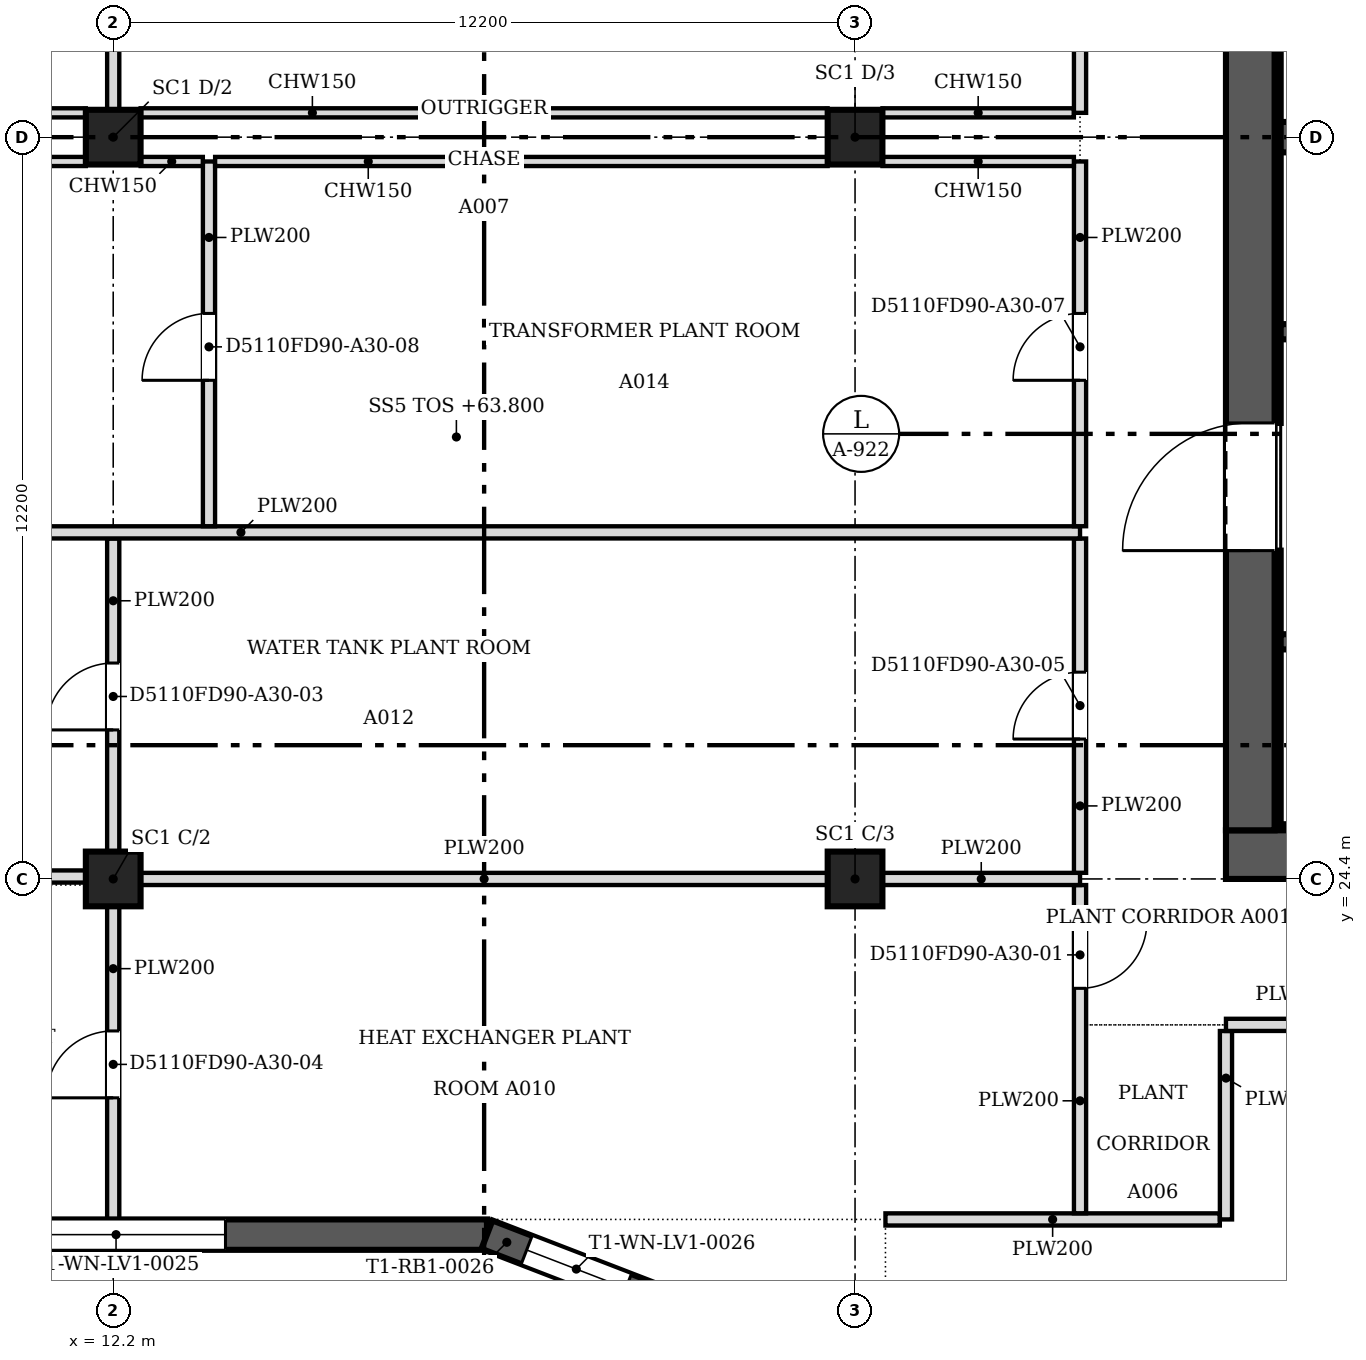
"""IFC4 building model, lengths in metres.
Left out: names, types, materials, properties, quantities, classifications, styles, units other than length and angle.
Written with IfcOpenShell. Run it as: python <this file> out.ifc"""

import sys

from ifc_helpers import new_model, si_unit, direction, frame, frame_2d, origin, origin_2d, place, context, subcontext, project, spatial, polyline, rectangle, outline, extrude, faceted_brep, source, transform, mapped, element, fill, save


model = new_model("IFC4")
c1 = context("Model", 3, precision=1e-05, world=origin(), true_north=direction((0.0, 1.0)))
c2 = subcontext(c1, "Body", "Model", "MODEL_VIEW")
j1 = project(units=[si_unit("LENGTHUNIT", "METRE"), si_unit("PLANEANGLEUNIT", "RADIAN")], contexts=[c1])
p1 = place(None, origin())
s1 = spatial("IfcSite", under=j1, at=p1, CompositionType="ELEMENT")
p2 = place(p1, origin())
s2 = spatial("IfcBuilding", under=s1, at=p2, CompositionType="ELEMENT")
p3 = place(p2, frame((0.0, 0.0, 63.8)))
s3 = spatial("IfcBuildingStorey", under=s2, at=p3, CompositionType="ELEMENT", Elevation=63.8)
for number, where, z_axis, x_axis in (
    (1, (12.2, 24.4, 0.0), (0.0, 0.0, 1.0), (1.0, 0.0, 0.0)),
    (2, (12.2, 36.6, 0.0), (0.0, 0.0, 1.0), (1.0, 0.0, 0.0)),
    (3, (24.4, 24.4, 0.0), (0.0, 0.0, 1.0), (1.0, 0.0, 0.0)),
    (4, (24.4, 36.6, 0.0), (0.0, 0.0, 1.0), (1.0, 0.0, 0.0)),
):
    element("IfcColumn", number, at=place(p3, frame(where, z_axis=z_axis, x_axis=x_axis)), inside=s3, PredefinedType="COLUMN", context=c2, shape_type="SweptSolid", body=[
        extrude(rectangle(XDim=0.9, YDim=0.9, at=origin_2d()), origin(), (0.0, 0.0, 1.0), 4.6),
    ])
m1 = source(origin(), c2, "Body", "Brep", [
    faceted_brep([(0.0, -0.25, 0.0), (12.154, -0.25, 0.0), (12.154, -0.25, 4.8), (0.0, -0.25, 4.8), (0.047, 0.25, 4.8), (12.2, 0.25, 4.8), (12.2, 0.25, 0.0), (0.047, 0.25, 0.0), (12.2, -0.0, 0.0), (0.0, 0.0, 0.0), (12.2, -0.0, 4.8), (0.0, 0.0, 4.8)], [[[0, 1, 2, 3]], [[4, 5, 6, 7]], [[7, 6, 8, 1, 0, 9]], [[6, 5, 10, 8]], [[5, 4, 11, 3, 2, 10]], [[9, 0, 3, 11]], [[7, 9, 11, 4]], [[1, 8, 10, 2]]]),
])
p4 = place(p3, frame((6.146, 18.55, 0.0), z_axis=(0.0, 0.0, 1.0), x_axis=(1.0, 0.0, 0.0)))
e5 = element("IfcWall", 5, at=p4, inside=s3, PredefinedType="SOLIDWALL", context=c2, shape_type="MappedRepresentation", body=[
    mapped(m1, transform((0.0, 0.0, 0.0), scale=1.0)),
])
m2 = source(origin(), c2, "Body", "SweptSolid", [
    extrude(outline(polyline([(4.3, 0.8), (7.9, 0.8), (7.9, 4.0), (4.3, 4.0), (4.3, 0.8)])), frame((0.0, 0.26, 0.0), z_axis=(0.0, -1.0, 0.0), x_axis=(1.0, 0.0, 0.0)), (0.0, 0.0, 1.0), 0.52),
])
p5 = place(p4, origin())
e6 = element("IfcOpeningElement", 6, at=p5, cuts=e5, PredefinedType="OPENING", context=c2, shape_type="MappedRepresentation", body=[
    mapped(m2, transform((0.0, 0.0, 0.0), scale=1.0)),
])
m3 = source(origin(), c2, "Body", "Brep", [
    faceted_brep([(0.047, -0.25, 0.0), (3.096, -0.25, 0.0), (3.096, -0.25, 4.8), (0.047, -0.25, 4.8), (0.0, 0.25, 4.8), (3.149, 0.25, 4.8), (3.149, 0.25, 0.0), (0.0, 0.25, 0.0), (3.149, -0.0, 0.0), (0.0, 0.0, 0.0), (3.149, -0.0, 4.8), (0.0, 0.0, 4.8)], [[[0, 1, 2, 3]], [[4, 5, 6, 7]], [[7, 6, 8, 1, 0, 9]], [[6, 5, 10, 8]], [[5, 4, 11, 3, 2, 10]], [[4, 7, 9, 11]], [[9, 0, 3, 11]], [[1, 8, 10, 2]]]),
])
p6 = place(p3, frame((18.346, 18.55, 0.0), z_axis=(0.0, 0.0, 1.0), x_axis=(0.932987528699, -0.35990869855, 0.0)))
e7 = element("IfcWall", 7, at=p6, inside=s3, PredefinedType="SOLIDWALL", context=c2, shape_type="MappedRepresentation", body=[
    mapped(m3, transform((0.0, 0.0, 0.0), scale=1.0)),
])
m4 = source(origin(), c2, "Body", "SweptSolid", [
    extrude(outline(polyline([(0.7, 0.8), (2.449, 0.8), (2.449, 4.0), (0.7, 4.0), (0.7, 0.8)])), frame((0.0, 0.26, 0.0), z_axis=(0.0, -1.0, 0.0), x_axis=(1.0, 0.0, 0.0)), (0.0, 0.0, 1.0), 0.52),
])
p7 = place(p6, origin())
e8 = element("IfcOpeningElement", 8, at=p7, cuts=e7, PredefinedType="OPENING", context=c2, shape_type="MappedRepresentation", body=[
    mapped(m4, transform((0.0, 0.0, 0.0), scale=1.0)),
])
p8 = place(p3, frame((54.9, 24.8, 0.0), z_axis=(0.0, 0.0, 1.0), x_axis=(-1.0, 0.0, 0.0)))
e9 = element("IfcWall", 9, at=p8, inside=s3, PredefinedType="SHEAR", context=c2, shape_type="SweptSolid", body=[
    extrude(rectangle(XDim=24.4, YDim=0.8, at=frame_2d((12.2, 0.0))), origin(), (0.0, 0.0, 1.0), 4.8),
])
m5 = source(origin(), c2, "Body", "SweptSolid", [
    extrude(rectangle(XDim=1.2, YDim=2.1, at=frame_2d((0.6, 1.05))), frame((0.0, 0.41, 0.0), z_axis=(0.0, -1.0, 0.0), x_axis=(1.0, 0.0, 0.0)), (0.0, 0.0, 1.0), 0.82),
])
p9 = place(p8, frame((1.5, 0.0, 0.0)))
e10 = element("IfcOpeningElement", 10, at=p9, cuts=e9, PredefinedType="OPENING", context=c2, shape_type="MappedRepresentation", body=[
    mapped(m5, transform((0.0, 0.0, 0.0), scale=1.0)),
])
p10 = place(p3, frame((30.9, 25.2, 0.0), z_axis=(0.0, 0.0, 1.0), x_axis=(0.0, 1.0, 0.0)))
e11 = element("IfcWall", 11, at=p10, inside=s3, PredefinedType="SHEAR", context=c2, shape_type="SweptSolid", body=[
    extrude(rectangle(XDim=22.8, YDim=0.8, at=frame_2d((11.4, 0.0))), origin(), (0.0, 0.0, 1.0), 4.8),
])
m6 = source(origin(), c2, "Body", "SweptSolid", [
    extrude(rectangle(XDim=2.1, YDim=2.4, at=frame_2d((1.05, 1.2))), frame((0.0, 0.41, 0.0), z_axis=(0.0, -1.0, 0.0), x_axis=(1.0, 0.0, 0.0)), (0.0, 0.0, 1.0), 0.82),
])
p11 = place(p10, frame((4.6, 0.0, 0.0)))
e12 = element("IfcOpeningElement", 12, at=p11, cuts=e11, PredefinedType="OPENING", context=c2, shape_type="MappedRepresentation", body=[
    mapped(m6, transform((0.0, 0.0, 0.0), scale=1.0)),
])
p12 = place(p10, frame((16.1, 0.0, 0.0)))
e13 = element("IfcOpeningElement", 13, at=p12, cuts=e11, PredefinedType="OPENING", context=c2, shape_type="MappedRepresentation", body=[
    mapped(m6, transform((0.0, 0.0, 0.0), scale=1.0)),
])
p13 = place(p3, frame((31.3, 25.25, 0.0), z_axis=(0.0, 0.0, 1.0), x_axis=(1.0, 0.0, 0.0)))
e14 = element("IfcWall", 14, at=p13, inside=s3, PredefinedType="SOLIDWALL", context=c2, shape_type="SweptSolid", body=[
    extrude(rectangle(XDim=20.9, YDim=0.1, at=frame_2d((10.45, 0.0))), origin(), (0.0, 0.0, 1.0), 4.8),
])
p14 = place(p3, frame((31.35, 25.3, 0.0), z_axis=(0.0, 0.0, 1.0), x_axis=(0.0, 1.0, 0.0)))
e15 = element("IfcWall", 15, at=p14, inside=s3, PredefinedType="SOLIDWALL", context=c2, shape_type="SweptSolid", body=[
    extrude(rectangle(XDim=4.5, YDim=0.1, at=frame_2d((2.25, 0.0))), origin(), (0.0, 0.0, 1.0), 4.8),
])
p15 = place(p3, frame((31.35, 31.9, 0.0), z_axis=(0.0, 0.0, 1.0), x_axis=(0.0, 1.0, 0.0)))
e16 = element("IfcWall", 16, at=p15, inside=s3, PredefinedType="SOLIDWALL", context=c2, shape_type="SweptSolid", body=[
    extrude(rectangle(XDim=9.4, YDim=0.1, at=frame_2d((4.7, 0.0))), origin(), (0.0, 0.0, 1.0), 4.8),
])
p16 = place(p3, frame((31.4, 36.6, 0.0), z_axis=(0.0, 0.0, 1.0), x_axis=(1.0, 0.0, 0.0)))
e17 = element("IfcWall", 17, at=p16, inside=s3, PredefinedType="SHEAR", context=c2, shape_type="SweptSolid", body=[
    extrude(rectangle(XDim=16.95, YDim=0.5, at=frame_2d((8.475, 0.0))), origin(), (0.0, 0.0, 1.0), 4.8),
])
for number, where, z_axis, x_axis in (
    (18, (31.4, 33.4, 0.0), (0.0, 0.0, 1.0), (1.0, 0.0, 0.0)),
    (19, (31.4, 28.3, 0.0), (0.0, 0.0, 1.0), (1.0, 0.0, 0.0)),
):
    element("IfcWall", number, at=place(p3, frame(where, z_axis=z_axis, x_axis=x_axis)), inside=s3, PredefinedType="SOLIDWALL", context=c2, shape_type="SweptSolid", body=[
        extrude(rectangle(XDim=11.05, YDim=0.25, at=frame_2d((5.525, 0.0))), origin(), (0.0, 0.0, 1.0), 4.8),
    ])
p17 = place(p3, frame((12.2, 18.8, 0.0), z_axis=(0.0, 0.0, 1.0), x_axis=(0.0, 1.0, 0.0)))
e20 = element("IfcWall", 20, at=p17, inside=s3, PredefinedType="PARTITIONING", context=c2, shape_type="SweptSolid", body=[
    extrude(rectangle(XDim=5.149, YDim=0.2, at=frame_2d((2.574, 0.0))), origin(), (0.0, 0.0, 1.0), 4.067),
])
m7 = source(origin(), c2, "Body", "SweptSolid", [
    extrude(rectangle(XDim=1.1, YDim=2.1, at=frame_2d((0.55, 1.05))), frame((0.0, 0.11, 0.0), z_axis=(0.0, -1.0, 0.0), x_axis=(1.0, 0.0, 0.0)), (0.0, 0.0, 1.0), 0.22),
])
p18 = place(p17, frame((2.0, 0.0, 0.0)))
e21 = element("IfcOpeningElement", 21, at=p18, cuts=e20, PredefinedType="OPENING", context=c2, shape_type="MappedRepresentation", body=[
    mapped(m7, transform((0.0, 0.0, 0.0), scale=1.0)),
])
p19 = place(p3, frame((24.9, 18.8, 0.0), z_axis=(0.0, 0.0, 1.0), x_axis=(1.0, 0.0, 0.0)))
e22 = element("IfcWall", 22, at=p19, inside=s3, PredefinedType="PARTITIONING", context=c2, shape_type="SweptSolid", body=[
    extrude(rectangle(XDim=5.499, YDim=0.2, at=frame_2d((2.75, 0.0))), origin(), (0.0, 0.0, 1.0), 4.067),
])
p20 = place(p3, frame((30.5, 18.8, 0.0), z_axis=(0.0, 0.0, 1.0), x_axis=(0.0, 1.0, 0.0)))
e23 = element("IfcWall", 23, at=p20, inside=s3, PredefinedType="PARTITIONING", context=c2, shape_type="SweptSolid", body=[
    extrude(rectangle(XDim=3.099, YDim=0.2, at=frame_2d((1.549, 0.0))), origin(), (0.0, 0.0, 1.0), 4.067),
])
p21 = place(p3, frame((28.1, 18.901, 0.0), z_axis=(0.0, 0.0, 1.0), x_axis=(0.0, 1.0, 0.0)))
e24 = element("IfcWall", 24, at=p21, inside=s3, PredefinedType="PARTITIONING", context=c2, shape_type="SweptSolid", body=[
    extrude(rectangle(XDim=5.398, YDim=0.2, at=frame_2d((2.699, 0.0))), origin(), (0.0, 0.0, 1.0), 4.067),
])
p22 = place(p21, frame((3.7, 0.0, 0.0)))
e25 = element("IfcOpeningElement", 25, at=p22, cuts=e24, PredefinedType="OPENING", context=c2, shape_type="MappedRepresentation", body=[
    mapped(m7, transform((0.0, 0.0, 0.0), scale=1.0)),
])
p23 = place(p3, frame((36.2, 22.0, 0.0), z_axis=(0.0, 0.0, 1.0), x_axis=(-1.0, 0.0, 0.0)))
e26 = element("IfcWall", 26, at=p23, inside=s3, PredefinedType="PARTITIONING", context=c2, shape_type="SweptSolid", body=[
    extrude(rectangle(XDim=5.7, YDim=0.2, at=frame_2d((2.85, 0.0))), origin(), (0.0, 0.0, 1.0), 4.067),
])
p24 = place(p23, frame((2.3, 0.0, 0.0)))
e27 = element("IfcOpeningElement", 27, at=p24, cuts=e26, PredefinedType="OPENING", context=c2, shape_type="MappedRepresentation", body=[
    mapped(m7, transform((0.0, 0.0, 0.0), scale=1.0)),
])
p25 = place(p3, frame((0.536, 24.44, 0.0), z_axis=(0.0, 0.0, 1.0), x_axis=(1.0, 0.0, 0.0)))
e28 = element("IfcWall", 28, at=p25, inside=s3, PredefinedType="PARTITIONING", context=c2, shape_type="SweptSolid", body=[
    extrude(rectangle(XDim=11.213, YDim=0.2, at=frame_2d((5.606, 0.0))), origin(), (0.0, 0.0, 1.0), 4.067),
])
p26 = place(p3, frame((12.651, 24.4, 0.0), z_axis=(0.0, 0.0, 1.0), x_axis=(1.0, 0.0, 0.0)))
e29 = element("IfcWall", 29, at=p26, inside=s3, PredefinedType="PARTITIONING", context=c2, shape_type="SweptSolid", body=[
    extrude(rectangle(XDim=11.298, YDim=0.2, at=frame_2d((5.649, 0.0))), origin(), (0.0, 0.0, 1.0), 4.067),
])
p27 = place(p3, frame((24.851, 24.4, 0.0), z_axis=(0.0, 0.0, 1.0), x_axis=(1.0, 0.0, 0.0)))
e30 = element("IfcWall", 30, at=p27, inside=s3, PredefinedType="PARTITIONING", context=c2, shape_type="SweptSolid", body=[
    extrude(rectangle(XDim=3.249, YDim=0.2, at=frame_2d((1.625, 0.0))), origin(), (0.0, 0.0, 1.0), 4.067),
])
p28 = place(p3, frame((28.1, 24.501, 0.0), z_axis=(0.0, 0.0, 1.0), x_axis=(0.0, 1.0, 0.0)))
e31 = element("IfcWall", 31, at=p28, inside=s3, PredefinedType="PARTITIONING", context=c2, shape_type="SweptSolid", body=[
    extrude(rectangle(XDim=5.498, YDim=0.2, at=frame_2d((2.749, 0.0))), origin(), (0.0, 0.0, 1.0), 4.067),
])
p29 = place(p28, frame((2.2, 0.0, 0.0)))
e32 = element("IfcOpeningElement", 32, at=p29, cuts=e31, PredefinedType="OPENING", context=c2, shape_type="MappedRepresentation", body=[
    mapped(m7, transform((0.0, 0.0, 0.0), scale=1.0)),
])
p30 = place(p3, frame((12.2, 24.851, 0.0), z_axis=(0.0, 0.0, 1.0), x_axis=(0.0, 1.0, 0.0)))
e33 = element("IfcWall", 33, at=p30, inside=s3, PredefinedType="PARTITIONING", context=c2, shape_type="SweptSolid", body=[
    extrude(rectangle(XDim=5.148, YDim=0.2, at=frame_2d((2.574, 0.0))), origin(), (0.0, 0.0, 1.0), 4.067),
])
p31 = place(p30, frame((2.0, 0.0, 0.0)))
e34 = element("IfcOpeningElement", 34, at=p31, cuts=e33, PredefinedType="OPENING", context=c2, shape_type="MappedRepresentation", body=[
    mapped(m7, transform((0.0, 0.0, 0.0), scale=1.0)),
])
p32 = place(p3, frame((0.5, 30.1, 0.0), z_axis=(0.0, 0.0, 1.0), x_axis=(1.0, 0.0, 0.0)))
e35 = element("IfcWall", 35, at=p32, inside=s3, PredefinedType="PARTITIONING", context=c2, shape_type="SweptSolid", body=[
    extrude(rectangle(XDim=27.6, YDim=0.2, at=frame_2d((13.8, 0.0))), origin(), (0.0, 0.0, 1.0), 4.067),
])
p33 = place(p3, frame((13.775, 30.201, 0.0), z_axis=(0.0, 0.0, 1.0), x_axis=(0.0, 1.0, 0.0)))
e36 = element("IfcWall", 36, at=p33, inside=s3, PredefinedType="PARTITIONING", context=c2, shape_type="SweptSolid", body=[
    extrude(rectangle(XDim=5.999, YDim=0.2, at=frame_2d((3.0, 0.0))), origin(), (0.0, 0.0, 1.0), 4.067),
])
p34 = place(p33, frame((2.4, 0.0, 0.0)))
e37 = element("IfcOpeningElement", 37, at=p34, cuts=e36, PredefinedType="OPENING", context=c2, shape_type="MappedRepresentation", body=[
    mapped(m7, transform((0.0, 0.0, 0.0), scale=1.0)),
])
p35 = place(p3, frame((28.1, 30.201, 0.0), z_axis=(0.0, 0.0, 1.0), x_axis=(0.0, 1.0, 0.0)))
e38 = element("IfcWall", 38, at=p35, inside=s3, PredefinedType="PARTITIONING", context=c2, shape_type="SweptSolid", body=[
    extrude(rectangle(XDim=5.999, YDim=0.2, at=frame_2d((3.0, 0.0))), origin(), (0.0, 0.0, 1.0), 4.067),
])
p36 = place(p35, frame((2.4, 0.0, 0.0)))
e39 = element("IfcOpeningElement", 39, at=p36, cuts=e38, PredefinedType="OPENING", context=c2, shape_type="MappedRepresentation", body=[
    mapped(m7, transform((0.0, 0.0, 0.0), scale=1.0)),
])
p37 = place(p3, frame((0.5, 36.2, 0.0), z_axis=(0.0, 0.0, 1.0), x_axis=(1.0, 0.0, 0.0)))
e40 = element("IfcWall", 40, at=p37, inside=s3, PredefinedType="PARTITIONING", context=c2, shape_type="SweptSolid", body=[
    extrude(rectangle(XDim=11.249, YDim=0.15, at=frame_2d((5.625, 0.0))), origin(), (0.0, 0.0, 1.0), 4.067),
])
p38 = place(p3, frame((12.651, 36.2, 0.0), z_axis=(0.0, 0.0, 1.0), x_axis=(1.0, 0.0, 0.0)))
e41 = element("IfcWall", 41, at=p38, inside=s3, PredefinedType="PARTITIONING", context=c2, shape_type="SweptSolid", body=[
    extrude(rectangle(XDim=1.023, YDim=0.15, at=frame_2d((0.512, 0.0))), origin(), (0.0, 0.0, 1.0), 4.067),
])
p39 = place(p3, frame((13.876, 36.2, 0.0), z_axis=(0.0, 0.0, 1.0), x_axis=(1.0, 0.0, 0.0)))
e42 = element("IfcWall", 42, at=p39, inside=s3, PredefinedType="PARTITIONING", context=c2, shape_type="SweptSolid", body=[
    extrude(rectangle(XDim=10.073, YDim=0.15, at=frame_2d((5.037, 0.0))), origin(), (0.0, 0.0, 1.0), 4.067),
])
p40 = place(p3, frame((24.851, 36.2, 0.0), z_axis=(0.0, 0.0, 1.0), x_axis=(1.0, 0.0, 0.0)))
e43 = element("IfcWall", 43, at=p40, inside=s3, PredefinedType="PARTITIONING", context=c2, shape_type="SweptSolid", body=[
    extrude(rectangle(XDim=3.148, YDim=0.15, at=frame_2d((1.574, 0.0))), origin(), (0.0, 0.0, 1.0), 4.067),
])
p41 = place(p3, frame((0.5, 37.0, 0.0), z_axis=(0.0, 0.0, 1.0), x_axis=(1.0, 0.0, 0.0)))
e44 = element("IfcWall", 44, at=p41, inside=s3, PredefinedType="PARTITIONING", context=c2, shape_type="SweptSolid", body=[
    extrude(rectangle(XDim=11.249, YDim=0.15, at=frame_2d((5.625, 0.0))), origin(), (0.0, 0.0, 1.0), 4.067),
])
p42 = place(p3, frame((12.651, 37.0, 0.0), z_axis=(0.0, 0.0, 1.0), x_axis=(1.0, 0.0, 0.0)))
e45 = element("IfcWall", 45, at=p42, inside=s3, PredefinedType="PARTITIONING", context=c2, shape_type="SweptSolid", body=[
    extrude(rectangle(XDim=11.298, YDim=0.15, at=frame_2d((5.649, 0.0))), origin(), (0.0, 0.0, 1.0), 4.067),
])
p43 = place(p3, frame((24.851, 37.0, 0.0), z_axis=(0.0, 0.0, 1.0), x_axis=(1.0, 0.0, 0.0)))
e46 = element("IfcWall", 46, at=p43, inside=s3, PredefinedType="PARTITIONING", context=c2, shape_type="SweptSolid", body=[
    extrude(rectangle(XDim=3.148, YDim=0.15, at=frame_2d((1.574, 0.0))), origin(), (0.0, 0.0, 1.0), 4.067),
])
p44 = place(p3, frame((28.1, 37.0, 0.0), z_axis=(0.0, 0.0, 1.0), x_axis=(0.0, 1.0, 0.0)))
e47 = element("IfcWall", 47, at=p44, inside=s3, PredefinedType="PARTITIONING", context=c2, shape_type="SweptSolid", body=[
    extrude(rectangle(XDim=6.299, YDim=0.2, at=frame_2d((3.149, 0.0))), origin(), (0.0, 0.0, 1.0), 4.067),
])
p45 = place(p44, frame((2.6, 0.0, 0.0)))
e48 = element("IfcOpeningElement", 48, at=p45, cuts=e47, PredefinedType="OPENING", context=c2, shape_type="MappedRepresentation", body=[
    mapped(m7, transform((0.0, 0.0, 0.0), scale=1.0)),
])
p46 = place(p3, frame((12.2, 37.051, 0.0), z_axis=(0.0, 0.0, 1.0), x_axis=(0.0, 1.0, 0.0)))
e49 = element("IfcWall", 49, at=p46, inside=s3, PredefinedType="PARTITIONING", context=c2, shape_type="SweptSolid", body=[
    extrude(rectangle(XDim=6.248, YDim=0.2, at=frame_2d((3.124, 0.0))), origin(), (0.0, 0.0, 1.0), 4.067),
])
p47 = place(p46, frame((2.6, 0.0, 0.0)))
e50 = element("IfcOpeningElement", 50, at=p47, cuts=e49, PredefinedType="OPENING", context=c2, shape_type="MappedRepresentation", body=[
    mapped(m7, transform((0.0, 0.0, 0.0), scale=1.0)),
])
m8 = source(origin(), c2, "Body", "SweptSolid", [
    extrude(outline(polyline([(4.3, 0.8), (7.9, 0.8), (7.9, 4.0), (4.3, 4.0), (4.3, 0.8)])), frame((0.0, 0.03, 0.0), z_axis=(0.0, -1.0, 0.0), x_axis=(1.0, 0.0, 0.0)), (0.0, 0.0, 1.0), 0.06),
])
p48 = place(p5, origin())
e51 = element("IfcWindow", 51, at=p48, inside=s3, PartitioningType="USERDEFINED", PredefinedType="WINDOW", context=c2, shape_type="MappedRepresentation", body=[
    mapped(m8, transform((0.0, 0.0, 0.0), scale=1.0)),
])
fill(e6, e51)
m9 = source(origin(), c2, "Body", "SweptSolid", [
    extrude(outline(polyline([(0.7, 0.8), (2.449, 0.8), (2.449, 4.0), (0.7, 4.0), (0.7, 0.8)])), frame((0.0, 0.03, 0.0), z_axis=(0.0, -1.0, 0.0), x_axis=(1.0, 0.0, 0.0)), (0.0, 0.0, 1.0), 0.06),
])
p49 = place(p7, origin())
e52 = element("IfcWindow", 52, at=p49, inside=s3, PartitioningType="USERDEFINED", PredefinedType="WINDOW", context=c2, shape_type="MappedRepresentation", body=[
    mapped(m9, transform((0.0, 0.0, 0.0), scale=1.0)),
])
fill(e8, e52)
m10 = source(origin(), c2, "Body", "SweptSolid", [
    extrude(rectangle(XDim=2.1, YDim=2.4, at=frame_2d((1.05, 1.2))), frame((0.0, 0.025, 0.0), z_axis=(0.0, -1.0, 0.0), x_axis=(1.0, 0.0, 0.0)), (0.0, 0.0, 1.0), 0.05),
])
p50 = place(p11, origin())
e53 = element("IfcDoor", 53, at=p50, inside=s3, OperationType="DOUBLE_DOOR_SINGLE_SWING", PredefinedType="DOOR", context=c2, shape_type="MappedRepresentation", body=[
    mapped(m10, transform((0.0, 0.0, 0.0), scale=1.0)),
])
fill(e12, e53)
m11 = source(origin(), c2, "Body", "SweptSolid", [
    extrude(rectangle(XDim=1.1, YDim=2.1, at=frame_2d((0.55, 1.05))), frame((0.0, 0.025, 0.0), z_axis=(0.0, -1.0, 0.0), x_axis=(1.0, 0.0, 0.0)), (0.0, 0.0, 1.0), 0.05),
])
p51 = place(p22, origin())
e54 = element("IfcDoor", 54, at=p51, inside=s3, OperationType="SINGLE_SWING_RIGHT", PredefinedType="DOOR", context=c2, shape_type="MappedRepresentation", body=[
    mapped(m11, transform((0.0, 0.0, 0.0), scale=1.0)),
])
fill(e25, e54)
p52 = place(p31, origin())
e55 = element("IfcDoor", 55, at=p52, inside=s3, OperationType="SINGLE_SWING_LEFT", PredefinedType="DOOR", context=c2, shape_type="MappedRepresentation", body=[
    mapped(m11, transform((0.0, 0.0, 0.0), scale=1.0)),
])
fill(e34, e55)
p53 = place(p18, origin())
e56 = element("IfcDoor", 56, at=p53, inside=s3, OperationType="SINGLE_SWING_LEFT", PredefinedType="DOOR", context=c2, shape_type="MappedRepresentation", body=[
    mapped(m11, transform((0.0, 0.0, 0.0), scale=1.0)),
])
fill(e21, e56)
p54 = place(p29, origin())
e57 = element("IfcDoor", 57, at=p54, inside=s3, OperationType="SINGLE_SWING_LEFT", PredefinedType="DOOR", context=c2, shape_type="MappedRepresentation", body=[
    mapped(m11, transform((0.0, 0.0, 0.0), scale=1.0)),
])
fill(e32, e57)
p55 = place(p36, origin())
e58 = element("IfcDoor", 58, at=p55, inside=s3, OperationType="SINGLE_SWING_LEFT", PredefinedType="DOOR", context=c2, shape_type="MappedRepresentation", body=[
    mapped(m11, transform((0.0, 0.0, 0.0), scale=1.0)),
])
fill(e39, e58)
p56 = place(p34, origin())
e59 = element("IfcDoor", 59, at=p56, inside=s3, OperationType="SINGLE_SWING_LEFT", PredefinedType="DOOR", context=c2, shape_type="MappedRepresentation", body=[
    mapped(m11, transform((0.0, 0.0, 0.0), scale=1.0)),
])
fill(e37, e59)
save(model, sys.argv[1])
